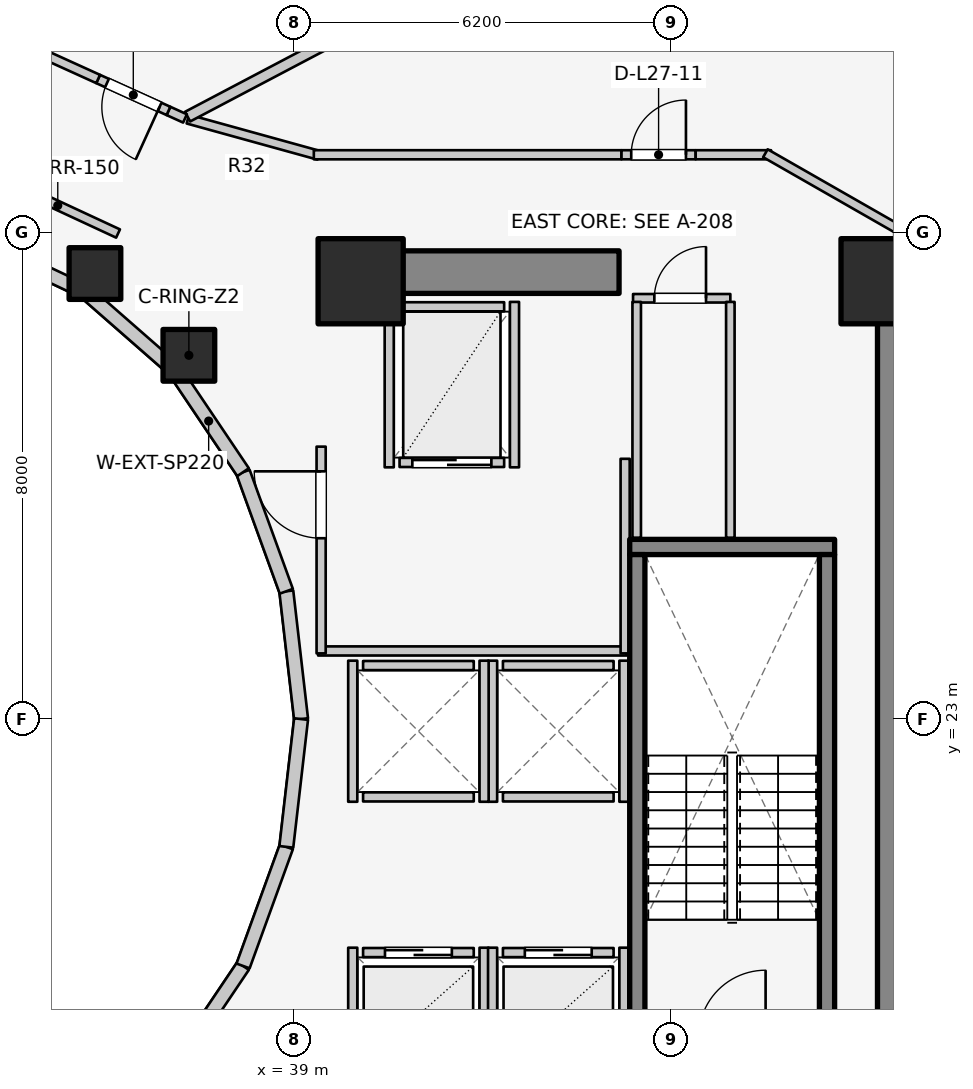
"""IFC4 building model, lengths in metres.
Left out: names, types, materials, properties, quantities, classifications, styles, units other than length and angle.
Written with IfcOpenShell. Run it as: python <this file> out.ifc"""

import sys

from ifc_helpers import new_model, si_unit, direction, frame, frame_2d, origin, origin_2d, place, context, subcontext, project, spatial, rectangle, extrude, element, fill, save


model = new_model("IFC4")
c1 = context("Model", 3, precision=1e-05, world=origin(), true_north=direction((0.0, 1.0)))
c2 = subcontext(c1, "Body", "Model", "MODEL_VIEW")
j1 = project(units=[si_unit("LENGTHUNIT", "METRE"), si_unit("PLANEANGLEUNIT", "RADIAN")], contexts=[c1])
p1 = place(None, origin())
s1 = spatial("IfcSite", under=j1, at=p1, CompositionType="ELEMENT")
p2 = place(p1, origin())
s2 = spatial("IfcBuilding", under=s1, at=p2, CompositionType="ELEMENT")
p3 = place(p2, frame((0.0, 0.0, 91.8)))
s3 = spatial("IfcBuildingStorey", under=s2, at=p3, CompositionType="ELEMENT", Elevation=91.8)
p4 = place(p3, frame((48.95, 17.05, 0.0), z_axis=(0.0, 0.0, 1.0), x_axis=(0.0, 1.0, 0.0)))
e1 = element("IfcWall", 1, at=p4, inside=s3, PredefinedType="SHEAR", context=c2, shape_type="SweptSolid", body=[
    extrude(rectangle(XDim=12.8, YDim=0.7, at=frame_2d((6.4, 0.0))), origin(), (0.0, 0.0, 1.0), 3.1),
])
p5 = place(p3, frame((39.85, 30.35, 0.0), z_axis=(0.0, 0.0, 1.0), x_axis=(1.0, 0.0, 0.0)))
e2 = element("IfcWall", 2, at=p5, inside=s3, PredefinedType="SHEAR", context=c2, shape_type="SweptSolid", body=[
    extrude(rectangle(XDim=4.5, YDim=0.7, at=frame_2d((2.25, 0.0))), origin(), (0.0, 0.0, 1.0), 3.1),
])
p6 = place(p3, frame((44.525, 25.83, 0.0), z_axis=(0.0, 0.0, 1.0), x_axis=(1.0, 0.0, 0.0)))
e3 = element("IfcWall", 3, at=p6, inside=s3, PredefinedType="SOLIDWALL", context=c2, shape_type="SweptSolid", body=[
    extrude(rectangle(XDim=3.37, YDim=0.25, at=frame_2d((1.685, 0.0))), origin(), (0.0, 0.0, 1.0), 3.1),
])
for number, where, z_axis, x_axis in (
    (4, (44.65, 17.895, 0.0), (0.0, 0.0, 1.0), (0.0, 1.0, 0.0)),
    (5, (47.77, 17.895, 0.0), (0.0, 0.0, 1.0), (0.0, 1.0, 0.0)),
):
    element("IfcWall", number, at=place(p3, frame(where, z_axis=z_axis, x_axis=x_axis)), inside=s3, PredefinedType="SOLIDWALL", context=c2, shape_type="SweptSolid", body=[
        extrude(rectangle(XDim=7.81, YDim=0.25, at=frame_2d((3.905, 0.0))), origin(), (0.0, 0.0, 1.0), 3.1),
    ])
for number, where, z_axis, x_axis in (
    (6, (48.7, 30.2, 0.0), (0.0, 0.0, 1.0), (1.0, 0.0, 0.0)),
    (7, (40.1, 30.2, 0.0), (0.0, 0.0, 1.0), (1.0, 0.0, 0.0)),
):
    element("IfcColumn", number, at=place(p3, frame(where, z_axis=z_axis, x_axis=x_axis)), inside=s3, PredefinedType="COLUMN", context=c2, shape_type="SweptSolid", body=[
        extrude(rectangle(XDim=1.4, YDim=1.4, at=origin_2d()), origin(), (0.0, 0.0, 1.0), 3.1),
    ])
for number, where, z_axis, x_axis in (
    (8, (37.275, 28.982, 0.0), (0.0, 0.0, 1.0), (1.0, 0.0, 0.0)),
    (9, (35.73, 30.327, 0.0), (0.0, 0.0, 1.0), (1.0, 0.0, 0.0)),
):
    element("IfcColumn", number, at=place(p3, frame(where, z_axis=z_axis, x_axis=x_axis)), inside=s3, PredefinedType="COLUMN", context=c2, shape_type="SweptSolid", body=[
        extrude(rectangle(XDim=0.85, YDim=0.85, at=origin_2d()), origin(), (0.0, 0.0, 1.0), 3.1),
    ])
p7 = place(p3, frame((39.12, 23.0, 0.0), z_axis=(0.0, 0.0, 1.0), x_axis=(-0.114711713601, 0.993398823617, 0.0)))
e10 = element("IfcWall", 10, at=p7, inside=s3, PredefinedType="STANDARD", context=c2, shape_type="SweptSolid", body=[
    extrude(rectangle(XDim=2.115, YDim=0.23, at=frame_2d((1.058, 0.0))), origin(), (0.0, 0.0, 1.0), 2.56),
])
p8 = place(p3, frame((38.877, 25.102, 0.0), z_axis=(0.0, 0.0, 1.0), x_axis=(-0.341423187295, 0.93990968033, 0.0)))
e11 = element("IfcWall", 11, at=p8, inside=s3, PredefinedType="STANDARD", context=c2, shape_type="SweptSolid", body=[
    extrude(rectangle(XDim=2.084, YDim=0.23, at=frame_2d((1.042, 0.0))), origin(), (0.0, 0.0, 1.0), 2.56),
])
p9 = place(p3, frame((38.166, 27.06, 0.0), z_axis=(0.0, 0.0, 1.0), x_axis=(-0.558197800898, 0.829707909492, 0.0)))
e12 = element("IfcWall", 12, at=p9, inside=s3, PredefinedType="STANDARD", context=c2, shape_type="SweptSolid", body=[
    extrude(rectangle(XDim=2.027, YDim=0.23, at=frame_2d((1.013, 0.0))), origin(), (0.0, 0.0, 1.0), 1.22),
])
p10 = place(p3, frame((37.035, 28.742, 0.0), z_axis=(0.0, 0.0, 1.0), x_axis=(-0.752576694707, 0.658504607869, 0.0)))
e13 = element("IfcWall", 13, at=p10, inside=s3, PredefinedType="STANDARD", context=c2, shape_type="SweptSolid", body=[
    extrude(rectangle(XDim=1.959, YDim=0.23, at=frame_2d((0.98, 0.0))), origin(), (0.0, 0.0, 1.0), 1.22),
])
p11 = place(p3, frame((35.56, 30.032, 0.0), z_axis=(0.0, 0.0, 1.0), x_axis=(-0.904179699603, 0.427152280606, 0.0)))
e14 = element("IfcWall", 14, at=p11, inside=s3, PredefinedType="STANDARD", context=c2, shape_type="SweptSolid", body=[
    extrude(rectangle(XDim=1.899, YDim=0.23, at=frame_2d((0.95, 0.0))), origin(), (0.0, 0.0, 1.0), 1.22),
])
p12 = place(p3, frame((37.035, 17.258, 0.0), z_axis=(0.0, 0.0, 1.0), x_axis=(0.558197800898, 0.829707909492, 0.0)))
e15 = element("IfcWall", 15, at=p12, inside=s3, PredefinedType="STANDARD", context=c2, shape_type="SweptSolid", body=[
    extrude(rectangle(XDim=2.027, YDim=0.23, at=frame_2d((1.013, 0.0))), origin(), (0.0, 0.0, 1.0), 1.22),
])
p13 = place(p3, frame((38.166, 18.94, 0.0), z_axis=(0.0, 0.0, 1.0), x_axis=(0.341423187295, 0.93990968033, 0.0)))
e16 = element("IfcWall", 16, at=p13, inside=s3, PredefinedType="STANDARD", context=c2, shape_type="SweptSolid", body=[
    extrude(rectangle(XDim=2.084, YDim=0.23, at=frame_2d((1.042, 0.0))), origin(), (0.0, 0.0, 1.0), 2.56),
])
p14 = place(p3, frame((38.877, 20.898, 0.0), z_axis=(0.0, 0.0, 1.0), x_axis=(0.114711713601, 0.993398823617, 0.0)))
e17 = element("IfcWall", 17, at=p14, inside=s3, PredefinedType="STANDARD", context=c2, shape_type="SweptSolid", body=[
    extrude(rectangle(XDim=2.115, YDim=0.23, at=frame_2d((1.058, 0.0))), origin(), (0.0, 0.0, 1.0), 2.56),
])
p15 = place(p3, frame((40.14, 19.16, 0.0), z_axis=(0.0, 0.0, 1.0), x_axis=(1.0, 0.0, 0.0)))
e18 = element("IfcWall", 18, at=p15, inside=s3, PredefinedType="SOLIDWALL", context=c2, shape_type="SweptSolid", body=[
    extrude(rectangle(XDim=1.82, YDim=0.15, at=frame_2d((0.91, 0.0))), origin(), (0.0, 0.0, 1.0), 2.12),
])
p16 = place(p15, frame((0.36, 0.0, 0.0)))
e19 = element("IfcOpeningElement", 19, at=p16, cuts=e18, PredefinedType="OPENING", context=c2, shape_type="SweptSolid", body=[
    extrude(rectangle(XDim=1.1, YDim=2.1, at=frame_2d((0.55, 1.05))), frame((0.0, 0.085, 0.0), z_axis=(0.0, -1.0, 0.0), x_axis=(1.0, 0.0, 0.0)), (0.0, 0.0, 1.0), 0.17),
])
p17 = place(p3, frame((39.97, 17.02, 0.0), z_axis=(0.0, 0.0, 1.0), x_axis=(0.0, 1.0, 0.0)))
e20 = element("IfcWall", 20, at=p17, inside=s3, PredefinedType="SOLIDWALL", context=c2, shape_type="SweptSolid", body=[
    extrude(rectangle(XDim=2.22, YDim=0.15, at=frame_2d((1.11, 0.0))), origin(), (0.0, 0.0, 1.0), 1.873),
])
p18 = place(p3, frame((42.13, 17.02, 0.0), z_axis=(0.0, 0.0, 1.0), x_axis=(0.0, 1.0, 0.0)))
e21 = element("IfcWall", 21, at=p18, inside=s3, PredefinedType="SOLIDWALL", context=c2, shape_type="SweptSolid", body=[
    extrude(rectangle(XDim=2.22, YDim=0.15, at=frame_2d((1.11, 0.0))), origin(), (0.0, 0.0, 1.0), 2.575),
])
p19 = place(p3, frame((42.44, 19.16, 0.0), z_axis=(0.0, 0.0, 1.0), x_axis=(1.0, 0.0, 0.0)))
e22 = element("IfcWall", 22, at=p19, inside=s3, PredefinedType="SOLIDWALL", context=c2, shape_type="SweptSolid", body=[
    extrude(rectangle(XDim=1.82, YDim=0.15, at=frame_2d((0.91, 0.0))), origin(), (0.0, 0.0, 1.0), 2.575),
])
p20 = place(p19, frame((0.36, 0.0, 0.0)))
e23 = element("IfcOpeningElement", 23, at=p20, cuts=e22, PredefinedType="OPENING", context=c2, shape_type="SweptSolid", body=[
    extrude(rectangle(XDim=1.1, YDim=2.1, at=frame_2d((0.55, 1.05))), frame((0.0, 0.085, 0.0), z_axis=(0.0, -1.0, 0.0), x_axis=(1.0, 0.0, 0.0)), (0.0, 0.0, 1.0), 0.17),
])
p21 = place(p3, frame((42.27, 17.02, 0.0), z_axis=(0.0, 0.0, 1.0), x_axis=(0.0, 1.0, 0.0)))
e24 = element("IfcWall", 24, at=p21, inside=s3, PredefinedType="SOLIDWALL", context=c2, shape_type="SweptSolid", body=[
    extrude(rectangle(XDim=2.22, YDim=0.15, at=frame_2d((1.11, 0.0))), origin(), (0.0, 0.0, 1.0), 2.575),
])
p22 = place(p3, frame((44.43, 17.02, 0.0), z_axis=(0.0, 0.0, 1.0), x_axis=(0.0, 1.0, 0.0)))
e25 = element("IfcWall", 25, at=p22, inside=s3, PredefinedType="SOLIDWALL", context=c2, shape_type="SweptSolid", body=[
    extrude(rectangle(XDim=2.22, YDim=0.15, at=frame_2d((1.11, 0.0))), origin(), (0.0, 0.0, 1.0), 2.12),
])
for number, where, z_axis, x_axis in (
    (26, (42.44, 21.72, 0.0), (0.0, 0.0, 1.0), (1.0, 0.0, 0.0)),
    (27, (42.44, 23.88, 0.0), (0.0, 0.0, 1.0), (1.0, 0.0, 0.0)),
):
    element("IfcWall", number, at=place(p3, frame(where, z_axis=z_axis, x_axis=x_axis)), inside=s3, PredefinedType="SOLIDWALL", context=c2, shape_type="SweptSolid", body=[
        extrude(rectangle(XDim=1.82, YDim=0.15, at=frame_2d((0.91, 0.0))), origin(), (0.0, 0.0, 1.0), 2.575),
    ])
for number, where, z_axis, x_axis in (
    (28, (42.27, 21.64, 0.0), (0.0, 0.0, 1.0), (0.0, 1.0, 0.0)),
    (29, (44.43, 21.64, 0.0), (0.0, 0.0, 1.0), (0.0, 1.0, 0.0)),
):
    element("IfcWall", number, at=place(p3, frame(where, z_axis=z_axis, x_axis=x_axis)), inside=s3, PredefinedType="SOLIDWALL", context=c2, shape_type="SweptSolid", body=[
        extrude(rectangle(XDim=2.32, YDim=0.15, at=frame_2d((1.16, 0.0))), origin(), (0.0, 0.0, 1.0), 2.575),
    ])
for number, where, z_axis, x_axis in (
    (30, (40.14, 21.72, 0.0), (0.0, 0.0, 1.0), (1.0, 0.0, 0.0)),
    (31, (40.14, 23.88, 0.0), (0.0, 0.0, 1.0), (1.0, 0.0, 0.0)),
):
    element("IfcWall", number, at=place(p3, frame(where, z_axis=z_axis, x_axis=x_axis)), inside=s3, PredefinedType="SOLIDWALL", context=c2, shape_type="SweptSolid", body=[
        extrude(rectangle(XDim=1.82, YDim=0.15, at=frame_2d((0.91, 0.0))), origin(), (0.0, 0.0, 1.0), 2.12),
    ])
p23 = place(p3, frame((39.97, 21.64, 0.0), z_axis=(0.0, 0.0, 1.0), x_axis=(0.0, 1.0, 0.0)))
e32 = element("IfcWall", 32, at=p23, inside=s3, PredefinedType="SOLIDWALL", context=c2, shape_type="SweptSolid", body=[
    extrude(rectangle(XDim=2.32, YDim=0.15, at=frame_2d((1.16, 0.0))), origin(), (0.0, 0.0, 1.0), 2.12),
])
p24 = place(p3, frame((42.13, 21.64, 0.0), z_axis=(0.0, 0.0, 1.0), x_axis=(0.0, 1.0, 0.0)))
e33 = element("IfcWall", 33, at=p24, inside=s3, PredefinedType="SOLIDWALL", context=c2, shape_type="SweptSolid", body=[
    extrude(rectangle(XDim=2.32, YDim=0.15, at=frame_2d((1.16, 0.0))), origin(), (0.0, 0.0, 1.0), 2.575),
])
p25 = place(p3, frame((40.74, 27.22, 0.0), z_axis=(0.0, 0.0, 1.0), x_axis=(1.0, 0.0, 0.0)))
e34 = element("IfcWall", 34, at=p25, inside=s3, PredefinedType="SOLIDWALL", context=c2, shape_type="SweptSolid", body=[
    extrude(rectangle(XDim=1.72, YDim=0.15, at=frame_2d((0.86, 0.0))), origin(), (0.0, 0.0, 1.0), 2.575),
])
p26 = place(p25, frame((0.21, 0.0, 0.0)))
e35 = element("IfcOpeningElement", 35, at=p26, cuts=e34, PredefinedType="OPENING", context=c2, shape_type="SweptSolid", body=[
    extrude(rectangle(XDim=1.3, YDim=2.1, at=frame_2d((0.65, 1.05))), frame((0.0, 0.085, 0.0), z_axis=(0.0, -1.0, 0.0), x_axis=(1.0, 0.0, 0.0)), (0.0, 0.0, 1.0), 0.17),
])
p27 = place(p3, frame((40.74, 29.78, 0.0), z_axis=(0.0, 0.0, 1.0), x_axis=(1.0, 0.0, 0.0)))
e36 = element("IfcWall", 36, at=p27, inside=s3, PredefinedType="SOLIDWALL", context=c2, shape_type="SweptSolid", body=[
    extrude(rectangle(XDim=1.72, YDim=0.15, at=frame_2d((0.86, 0.0))), origin(), (0.0, 0.0, 1.0), 2.575),
])
for number, where, z_axis, x_axis in (
    (37, (40.57, 27.14, 0.0), (0.0, 0.0, 1.0), (0.0, 1.0, 0.0)),
    (38, (42.63, 27.14, 0.0), (0.0, 0.0, 1.0), (0.0, 1.0, 0.0)),
):
    element("IfcWall", number, at=place(p3, frame(where, z_axis=z_axis, x_axis=x_axis)), inside=s3, PredefinedType="SOLIDWALL", context=c2, shape_type="SweptSolid", body=[
        extrude(rectangle(XDim=2.72, YDim=0.15, at=frame_2d((1.36, 0.0))), origin(), (0.0, 0.0, 1.0), 2.575),
    ])
p28 = place(p3, frame((39.4, 24.12, 0.0), z_axis=(0.0, 0.0, 1.0), x_axis=(1.0, 0.0, 0.0)))
e39 = element("IfcWall", 39, at=p28, inside=s3, PredefinedType="PARTITIONING", context=c2, shape_type="SweptSolid", body=[
    extrude(rectangle(XDim=5.08, YDim=0.15, at=frame_2d((2.54, 0.0))), origin(), (0.0, 0.0, 1.0), 2.12),
])
p29 = place(p3, frame((44.45, 24.08, 0.0), z_axis=(0.0, 0.0, 1.0), x_axis=(0.0, 1.0, 0.0)))
e40 = element("IfcWall", 40, at=p29, inside=s3, PredefinedType="PARTITIONING", context=c2, shape_type="SweptSolid", body=[
    extrude(rectangle(XDim=3.2, YDim=0.15, at=frame_2d((1.6, 0.0))), origin(), (0.0, 0.0, 1.0), 2.575),
])
p30 = place(p3, frame((39.45, 24.08, 0.0), z_axis=(0.0, 0.0, 1.0), x_axis=(0.0, 1.0, 0.0)))
e41 = element("IfcWall", 41, at=p30, inside=s3, PredefinedType="PARTITIONING", context=c2, shape_type="SweptSolid", body=[
    extrude(rectangle(XDim=3.4, YDim=0.15, at=frame_2d((1.7, 0.0))), origin(), (0.0, 0.0, 1.0), 2.575),
])
p31 = place(p30, frame((1.894, 0.0, 0.0)))
e42 = element("IfcOpeningElement", 42, at=p31, cuts=e41, PredefinedType="OPENING", context=c2, shape_type="SweptSolid", body=[
    extrude(rectangle(XDim=1.1, YDim=2.1, at=frame_2d((0.55, 1.05))), frame((0.0, 0.085, 0.0), z_axis=(0.0, -1.0, 0.0), x_axis=(1.0, 0.0, 0.0)), (0.0, 0.0, 1.0), 0.17),
])
p32 = place(p3, frame((44.58, 29.92, 0.0), z_axis=(0.0, 0.0, 1.0), x_axis=(1.0, 0.0, 0.0)))
e43 = element("IfcWall", 43, at=p32, inside=s3, PredefinedType="PLUMBINGWALL", context=c2, shape_type="SweptSolid", body=[
    extrude(rectangle(XDim=1.6, YDim=0.14, at=frame_2d((0.8, 0.0))), origin(), (0.0, 0.0, 1.0), 2.575),
])
p33 = place(p32, frame((0.35, 0.0, 0.0)))
e44 = element("IfcOpeningElement", 44, at=p33, cuts=e43, PredefinedType="OPENING", context=c2, shape_type="SweptSolid", body=[
    extrude(rectangle(XDim=0.85, YDim=2.05, at=frame_2d((0.425, 1.025))), frame((0.0, 0.08, 0.0), z_axis=(0.0, -1.0, 0.0), x_axis=(1.0, 0.0, 0.0)), (0.0, 0.0, 1.0), 0.16),
])
for number, where, z_axis, x_axis in (
    (45, (44.64, 25.98, 0.0), (0.0, 0.0, 1.0), (0.0, 1.0, 0.0)),
    (46, (46.18, 25.98, 0.0), (0.0, 0.0, 1.0), (0.0, 1.0, 0.0)),
):
    element("IfcWall", number, at=place(p3, frame(where, z_axis=z_axis, x_axis=x_axis)), inside=s3, PredefinedType="PLUMBINGWALL", context=c2, shape_type="SweptSolid", body=[
        extrude(rectangle(XDim=3.88, YDim=0.14, at=frame_2d((1.94, 0.0))), origin(), (0.0, 0.0, 1.0), 2.575),
    ])
p34 = place(p3, frame((36.11, 30.985, 0.0), z_axis=(0.0, 0.0, 1.0), x_axis=(-0.906943449489, 0.421252393975, 0.0)))
e47 = element("IfcWall", 47, at=p34, inside=s3, PredefinedType="PARTITIONING", context=c2, shape_type="SweptSolid", body=[
    extrude(rectangle(XDim=2.186, YDim=0.15, at=frame_2d((1.093, 0.0))), origin(), (0.0, 0.0, 1.0), 1.992),
])
p35 = place(p3, frame((37.258, 32.867, 0.0), z_axis=(0.0, 0.0, 1.0), x_axis=(0.963833843713, -0.266503886865, 0.0)))
e48 = element("IfcWall", 48, at=p35, inside=s3, PredefinedType="PARTITIONING", context=c2, shape_type="SweptSolid", body=[
    extrude(rectangle(XDim=2.232, YDim=0.15, at=frame_2d((1.116, 0.0))), origin(), (0.0, 0.0, 1.0), 1.992),
])
p36 = place(p3, frame((39.33, 32.28, 0.0), z_axis=(0.0, 0.0, 1.0), x_axis=(1.0, 0.0, 0.0)))
e49 = element("IfcWall", 49, at=p36, inside=s3, PredefinedType="PARTITIONING", context=c2, shape_type="SweptSolid", body=[
    extrude(rectangle(XDim=5.06, YDim=0.15, at=frame_2d((2.53, 0.0))), origin(), (0.0, 0.0, 1.0), 1.992),
])
p37 = place(p3, frame((44.39, 32.28, 0.0), z_axis=(0.0, 0.0, 1.0), x_axis=(1.0, 0.0, 0.0)))
e50 = element("IfcWall", 50, at=p37, inside=s3, PredefinedType="PARTITIONING", context=c2, shape_type="SweptSolid", body=[
    extrude(rectangle(XDim=1.22, YDim=0.15, at=frame_2d((0.61, 0.0))), origin(), (0.0, 0.0, 1.0), 2.575),
])
p38 = place(p37, frame((0.16, 0.0, 0.0)))
e51 = element("IfcOpeningElement", 51, at=p38, cuts=e50, PredefinedType="OPENING", context=c2, shape_type="SweptSolid", body=[
    extrude(rectangle(XDim=0.9, YDim=2.1, at=frame_2d((0.45, 1.05))), frame((0.0, 0.085, 0.0), z_axis=(0.0, -1.0, 0.0), x_axis=(1.0, 0.0, 0.0)), (0.0, 0.0, 1.0), 0.17),
])
p39 = place(p3, frame((45.61, 32.28, 0.0), z_axis=(0.0, 0.0, 1.0), x_axis=(1.0, 0.0, 0.0)))
e52 = element("IfcWall", 52, at=p39, inside=s3, PredefinedType="PARTITIONING", context=c2, shape_type="SweptSolid", body=[
    extrude(rectangle(XDim=1.24, YDim=0.15, at=frame_2d((0.62, 0.0))), origin(), (0.0, 0.0, 1.0), 2.575),
])
p40 = place(p3, frame((46.757, 32.305, 0.0), z_axis=(0.0, 0.0, 1.0), x_axis=(0.867991349648, -0.496579315857, 0.0)))
e53 = element("IfcWall", 53, at=p40, inside=s3, PredefinedType="PARTITIONING", context=c2, shape_type="SweptSolid", body=[
    extrude(rectangle(XDim=2.567, YDim=0.15, at=frame_2d((1.283, 0.0))), origin(), (0.0, 0.0, 1.0), 1.22),
])
p41 = place(p3, frame((37.254, 32.907, 0.0), z_axis=(0.0, 0.0, 1.0), x_axis=(0.884730147854, 0.466103599512, 0.0)))
e54 = element("IfcWall", 54, at=p41, inside=s3, PredefinedType="PARTITIONING", context=c2, shape_type="SweptSolid", body=[
    extrude(rectangle(XDim=8.31, YDim=0.18, at=frame_2d((4.155, 0.0))), origin(), (0.0, 0.0, 1.0), 1.22),
])
p42 = place(p3, frame((34.656, 33.989, 0.0), z_axis=(0.0, 0.0, 1.0), x_axis=(0.757267205396, 0.653105182671, 0.0)))
e55 = element("IfcWall", 55, at=p42, inside=s3, PredefinedType="PLUMBINGWALL", context=c2, shape_type="SweptSolid", body=[
    extrude(rectangle(XDim=2.1, YDim=0.14, at=frame_2d((1.05, 0.0))), origin(), (0.0, 0.0, 1.0), 2.105),
])
p43 = place(p3, frame((37.211, 32.877, 0.0), z_axis=(0.0, 0.0, 1.0), x_axis=(-0.910618030944, 0.413249079514, 0.0)))
e56 = element("IfcWall", 56, at=p43, inside=s3, PredefinedType="PARTITIONING", context=c2, shape_type="SweptSolid", body=[
    extrude(rectangle(XDim=0.299, YDim=0.15, at=frame_2d((0.149, 0.0))), origin(), (0.0, 0.0, 1.0), 2.575),
])
p44 = place(p3, frame((36.939, 33.001, 0.0), z_axis=(0.0, 0.0, 1.0), x_axis=(-0.910563905594, 0.413368327075, 0.0)))
e57 = element("IfcWall", 57, at=p44, inside=s3, PredefinedType="PARTITIONING", context=c2, shape_type="SweptSolid", body=[
    extrude(rectangle(XDim=1.27, YDim=0.15, at=frame_2d((0.635, 0.0))), origin(), (0.0, 0.0, 1.0), 2.16),
])
p45 = place(p44, frame((0.16, 0.0, 0.0)))
e58 = element("IfcOpeningElement", 58, at=p45, cuts=e57, PredefinedType="OPENING", context=c2, shape_type="SweptSolid", body=[
    extrude(rectangle(XDim=0.95, YDim=2.1, at=frame_2d((0.475, 1.05))), frame((0.0, 0.085, 0.0), z_axis=(0.0, -1.0, 0.0), x_axis=(1.0, 0.0, 0.0)), (0.0, 0.0, 1.0), 0.17),
])
p46 = place(p3, frame((35.783, 33.526, 0.0), z_axis=(0.0, 0.0, 1.0), x_axis=(-0.910560970219, 0.413374793032, 0.0)))
e59 = element("IfcWall", 59, at=p46, inside=s3, PredefinedType="PARTITIONING", context=c2, shape_type="SweptSolid", body=[
    extrude(rectangle(XDim=1.203, YDim=0.15, at=frame_2d((0.602, 0.0))), origin(), (0.0, 0.0, 1.0), 1.992),
])
p47 = place(p16, origin())
e60 = element("IfcDoor", 60, at=p47, inside=s3, OperationType="DOUBLE_DOOR_SLIDING", PredefinedType="DOOR", context=c2, shape_type="SweptSolid", body=[
    extrude(rectangle(XDim=1.1, YDim=2.1, at=frame_2d((0.55, 1.05))), frame((0.0, 0.025, 0.0), z_axis=(0.0, -1.0, 0.0), x_axis=(1.0, 0.0, 0.0)), (0.0, 0.0, 1.0), 0.05),
])
fill(e19, e60)
p48 = place(p20, origin())
e61 = element("IfcDoor", 61, at=p48, inside=s3, OperationType="DOUBLE_DOOR_SLIDING", PredefinedType="DOOR", context=c2, shape_type="SweptSolid", body=[
    extrude(rectangle(XDim=1.1, YDim=2.1, at=frame_2d((0.55, 1.05))), frame((0.0, 0.025, 0.0), z_axis=(0.0, -1.0, 0.0), x_axis=(1.0, 0.0, 0.0)), (0.0, 0.0, 1.0), 0.05),
])
fill(e23, e61)
p49 = place(p26, origin())
e62 = element("IfcDoor", 62, at=p49, inside=s3, OperationType="DOUBLE_DOOR_SLIDING", PredefinedType="DOOR", context=c2, shape_type="SweptSolid", body=[
    extrude(rectangle(XDim=1.3, YDim=2.1, at=frame_2d((0.65, 1.05))), frame((0.0, 0.025, 0.0), z_axis=(0.0, -1.0, 0.0), x_axis=(1.0, 0.0, 0.0)), (0.0, 0.0, 1.0), 0.05),
])
fill(e35, e62)
p50 = place(p31, origin())
e63 = element("IfcDoor", 63, at=p50, inside=s3, OperationType="SINGLE_SWING_RIGHT", PredefinedType="DOOR", context=c2, shape_type="SweptSolid", body=[
    extrude(rectangle(XDim=1.1, YDim=2.1, at=frame_2d((0.55, 1.05))), frame((0.0, 0.025, 0.0), z_axis=(0.0, -1.0, 0.0), x_axis=(1.0, 0.0, 0.0)), (0.0, 0.0, 1.0), 0.05),
])
fill(e42, e63)
p51 = place(p33, origin())
e64 = element("IfcDoor", 64, at=p51, inside=s3, OperationType="SINGLE_SWING_RIGHT", PredefinedType="DOOR", context=c2, shape_type="SweptSolid", body=[
    extrude(rectangle(XDim=0.85, YDim=2.05, at=frame_2d((0.425, 1.025))), frame((0.0, 0.025, 0.0), z_axis=(0.0, -1.0, 0.0), x_axis=(1.0, 0.0, 0.0)), (0.0, 0.0, 1.0), 0.05),
])
fill(e44, e64)
p52 = place(p38, origin())
e65 = element("IfcDoor", 65, at=p52, inside=s3, OperationType="SINGLE_SWING_RIGHT", PredefinedType="DOOR", context=c2, shape_type="SweptSolid", body=[
    extrude(rectangle(XDim=0.9, YDim=2.1, at=frame_2d((0.45, 1.05))), frame((0.0, 0.025, 0.0), z_axis=(0.0, -1.0, 0.0), x_axis=(1.0, 0.0, 0.0)), (0.0, 0.0, 1.0), 0.05),
])
fill(e51, e65)
p53 = place(p45, origin())
e66 = element("IfcDoor", 66, at=p53, inside=s3, OperationType="SINGLE_SWING_LEFT", PredefinedType="DOOR", context=c2, shape_type="SweptSolid", body=[
    extrude(rectangle(XDim=0.95, YDim=2.1, at=frame_2d((0.475, 1.05))), frame((0.0, 0.025, 0.0), z_axis=(0.0, -1.0, 0.0), x_axis=(1.0, 0.0, 0.0)), (0.0, 0.0, 1.0), 0.05),
])
fill(e58, e66)
save(model, sys.argv[1])
